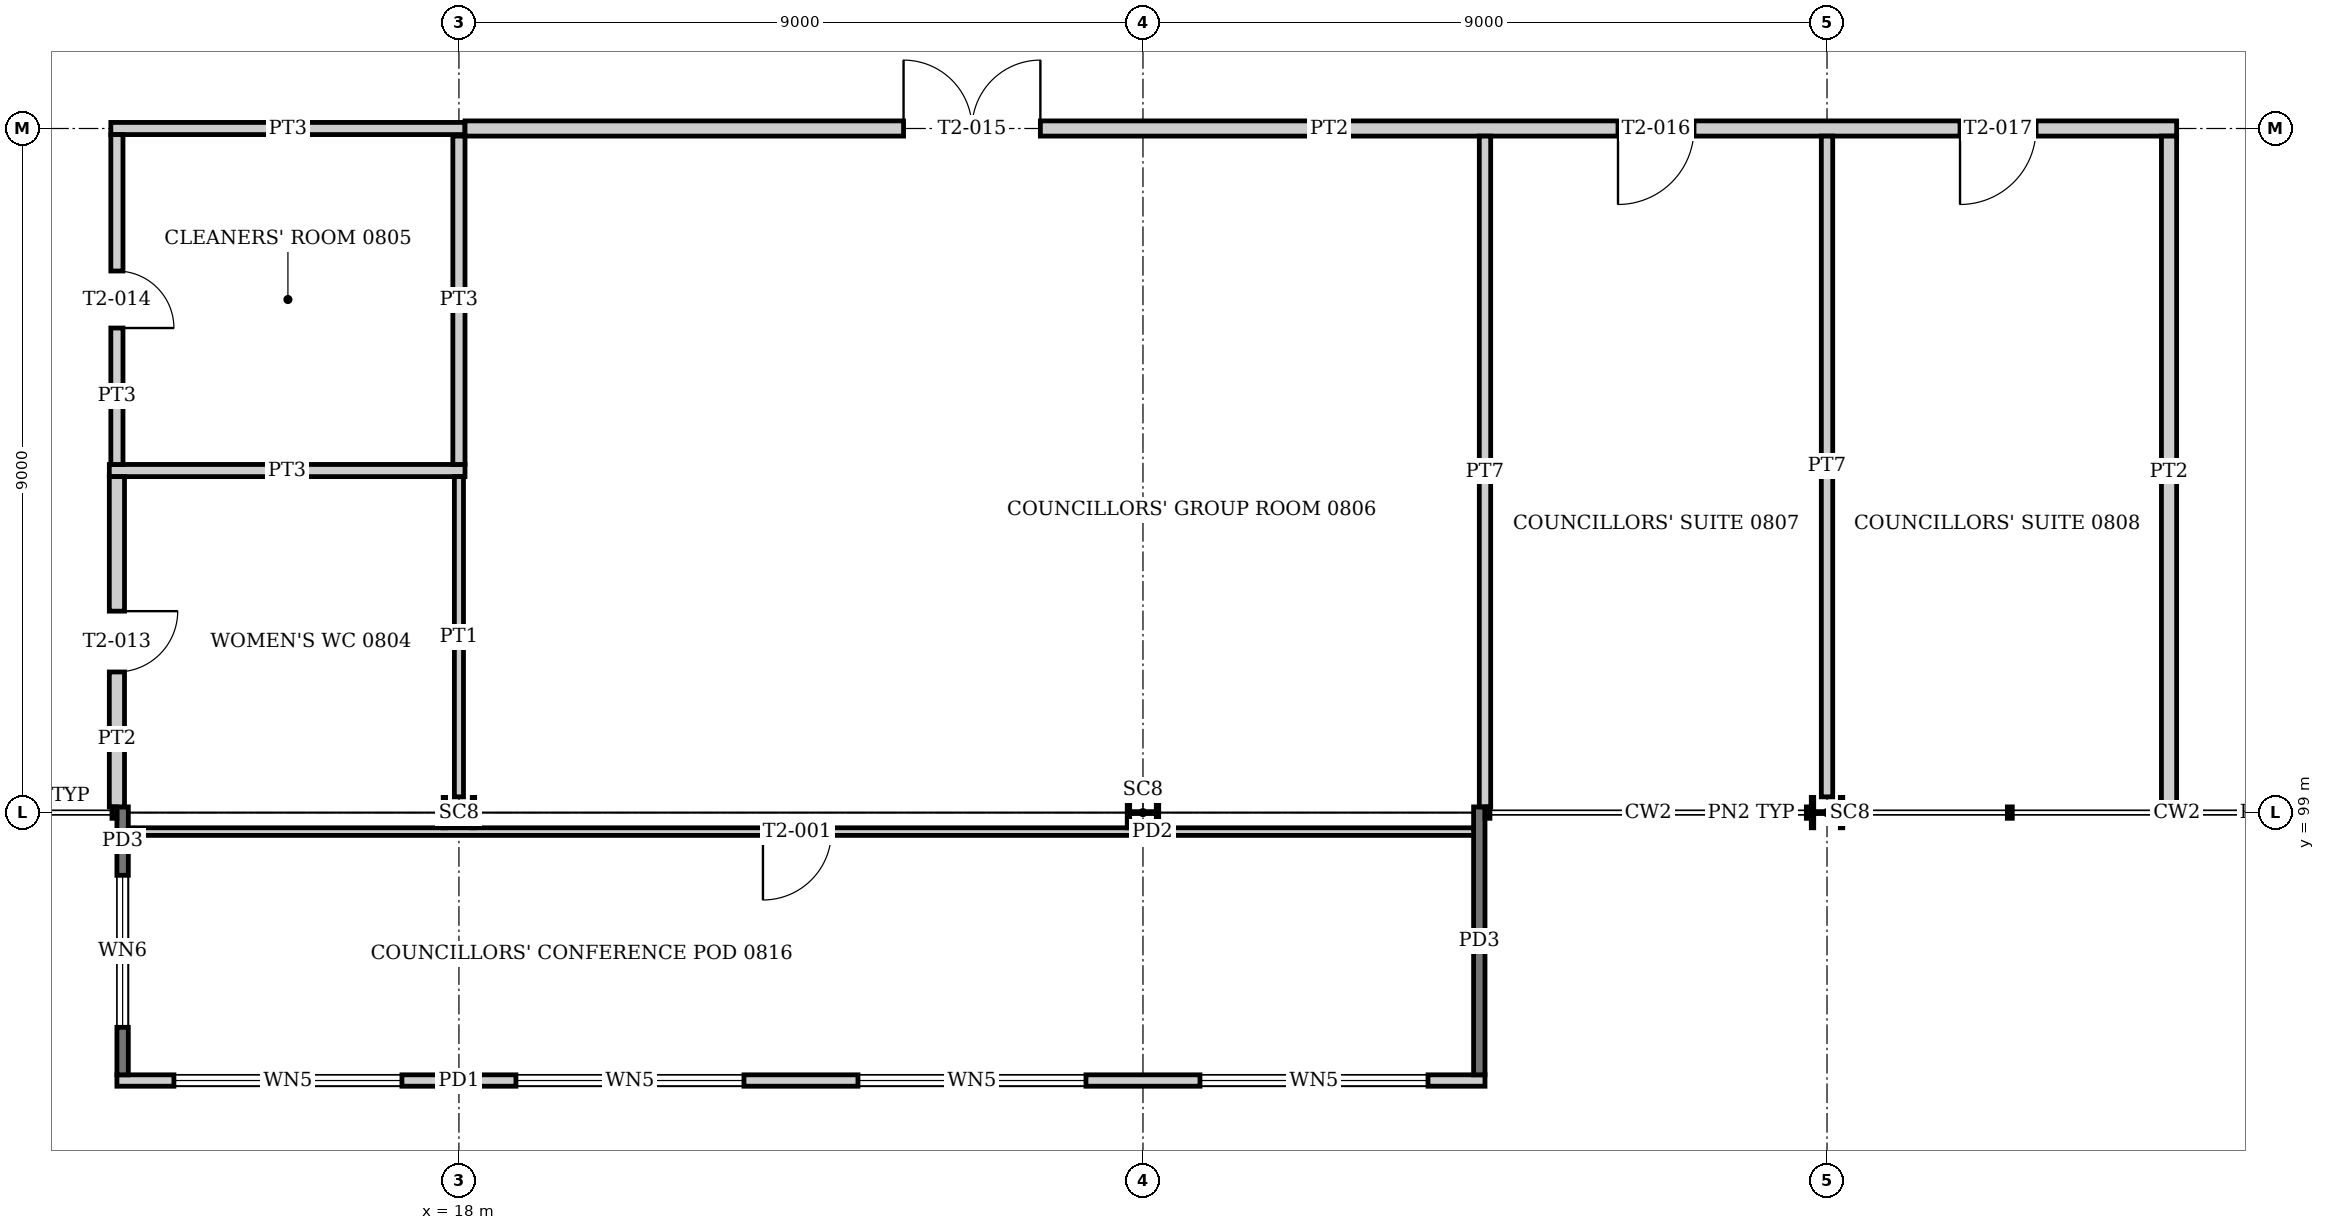
"""IFC4 building model, lengths in metres.
Left out: names, types, materials, properties, quantities, classifications, styles, units other than length and angle.
Written with IfcOpenShell. Run it as: python <this file> out.ifc"""

import sys

from ifc_helpers import new_model, si_unit, direction, frame, frame_2d, origin, origin_2d, place, context, subcontext, project, spatial, rectangle, i_section, extrude, element, fill, save


model = new_model("IFC4")
c1 = context("Model", 3, precision=1e-05, world=origin(), true_north=direction((0.0, 1.0)))
c2 = subcontext(c1, "Body", "Model", "MODEL_VIEW")
j1 = project(units=[si_unit("LENGTHUNIT", "METRE"), si_unit("PLANEANGLEUNIT", "RADIAN")], contexts=[c1])
p1 = place(None, origin())
s1 = spatial("IfcSite", under=j1, at=p1, CompositionType="ELEMENT")
p2 = place(p1, origin())
s2 = spatial("IfcBuilding", under=s1, at=p2, CompositionType="ELEMENT")
p3 = place(p2, frame((0.0, 0.0, 35.2)))
s3 = spatial("IfcBuildingStorey", under=s2, at=p3, CompositionType="ELEMENT", Elevation=35.2)
for number, where, z_axis, x_axis in (
    (1, (18.0, 99.0, 0.0), (0.0, 0.0, 1.0), (0.0, 1.0, 0.0)),
    (2, (27.0, 99.0, 0.0), (0.0, 0.0, 1.0), (0.0, 1.0, 0.0)),
    (3, (36.0, 99.0, 0.0), (0.0, 0.0, 1.0), (0.0, 1.0, 0.0)),
):
    element("IfcColumn", number, at=place(p3, frame(where, z_axis=z_axis, x_axis=x_axis)), inside=s3, PredefinedType="COLUMN", context=c2, shape_type="SweptSolid", body=[
        extrude(i_section(OverallWidth=0.4, OverallDepth=0.414, WebThickness=0.025, FlangeThickness=0.032, at=origin_2d()), origin(), (0.0, 0.0, 1.0), 4.0),
    ])
p4 = place(p3, frame((13.5, 95.475, 0.0), z_axis=(0.0, 0.0, 1.0), x_axis=(1.0, 0.0, 0.0)))
e4 = element("IfcWall", 4, at=p4, inside=s3, PredefinedType="SOLIDWALL", context=c2, shape_type="SweptSolid", body=[
    extrude(rectangle(XDim=18.0, YDim=0.15, at=frame_2d((9.0, 0.0))), origin(), (0.0, 0.0, 1.0), 2.6),
])
p5 = place(p4, frame((0.75, 0.0, 0.9)))
e5 = element("IfcOpeningElement", 5, at=p5, cuts=e4, PredefinedType="OPENING", context=c2, shape_type="SweptSolid", body=[
    extrude(rectangle(XDim=3.0, YDim=1.4, at=frame_2d((1.5, 0.7))), frame((0.0, 0.085, 0.0), z_axis=(0.0, -1.0, 0.0), x_axis=(1.0, 0.0, 0.0)), (0.0, 0.0, 1.0), 0.17),
])
p6 = place(p4, frame((5.25, 0.0, 0.9)))
e6 = element("IfcOpeningElement", 6, at=p6, cuts=e4, PredefinedType="OPENING", context=c2, shape_type="SweptSolid", body=[
    extrude(rectangle(XDim=3.0, YDim=1.4, at=frame_2d((1.5, 0.7))), frame((0.0, 0.085, 0.0), z_axis=(0.0, -1.0, 0.0), x_axis=(1.0, 0.0, 0.0)), (0.0, 0.0, 1.0), 0.17),
])
p7 = place(p4, frame((9.75, 0.0, 0.9)))
e7 = element("IfcOpeningElement", 7, at=p7, cuts=e4, PredefinedType="OPENING", context=c2, shape_type="SweptSolid", body=[
    extrude(rectangle(XDim=3.0, YDim=1.4, at=frame_2d((1.5, 0.7))), frame((0.0, 0.085, 0.0), z_axis=(0.0, -1.0, 0.0), x_axis=(1.0, 0.0, 0.0)), (0.0, 0.0, 1.0), 0.17),
])
p8 = place(p4, frame((14.25, 0.0, 0.9)))
e8 = element("IfcOpeningElement", 8, at=p8, cuts=e4, PredefinedType="OPENING", context=c2, shape_type="SweptSolid", body=[
    extrude(rectangle(XDim=3.0, YDim=1.4, at=frame_2d((1.5, 0.7))), frame((0.0, 0.085, 0.0), z_axis=(0.0, -1.0, 0.0), x_axis=(1.0, 0.0, 0.0)), (0.0, 0.0, 1.0), 0.17),
])
p9 = place(p3, frame((13.575, 95.55, -0.15), z_axis=(0.0, 0.0, 1.0), x_axis=(0.0, 1.0, 0.0)))
e9 = element("IfcWall", 9, at=p9, inside=s3, PredefinedType="SOLIDWALL", context=c2, shape_type="SweptSolid", body=[
    extrude(rectangle(XDim=3.525, YDim=0.15, at=frame_2d((1.762, 0.0))), origin(), (0.0, 0.0, 1.0), 2.75),
])
p10 = place(p9, frame((0.625, 0.0, 1.05)))
e10 = element("IfcOpeningElement", 10, at=p10, cuts=e9, PredefinedType="OPENING", context=c2, shape_type="SweptSolid", body=[
    extrude(rectangle(XDim=2.0, YDim=1.4, at=frame_2d((1.0, 0.7))), frame((0.0, 0.085, 0.0), z_axis=(0.0, -1.0, 0.0), x_axis=(1.0, 0.0, 0.0)), (0.0, 0.0, 1.0), 0.17),
])
p11 = place(p3, frame((31.425, 95.55, -0.15), z_axis=(0.0, 0.0, 1.0), x_axis=(0.0, 1.0, 0.0)))
e11 = element("IfcWall", 11, at=p11, inside=s3, PredefinedType="SOLIDWALL", context=c2, shape_type="SweptSolid", body=[
    extrude(rectangle(XDim=3.525, YDim=0.15, at=frame_2d((1.762, 0.0))), origin(), (0.0, 0.0, 1.0), 2.75),
])
p12 = place(p3, frame((13.65, 98.75, 0.0), z_axis=(0.0, 0.0, 1.0), x_axis=(1.0, 0.0, 0.0)))
e12 = element("IfcWall", 12, at=p12, inside=s3, PredefinedType="PARTITIONING", context=c2, shape_type="SweptSolid", body=[
    extrude(rectangle(XDim=17.7, YDim=0.1, at=frame_2d((8.85, 0.0))), origin(), (0.0, 0.0, 1.0), 2.6),
])
p13 = place(p12, frame((8.35, 0.0, 0.0)))
e13 = element("IfcOpeningElement", 13, at=p13, cuts=e12, PredefinedType="OPENING", context=c2, shape_type="SweptSolid", body=[
    extrude(rectangle(XDim=0.9, YDim=2.1, at=frame_2d((0.45, 1.05))), frame((0.0, 0.06, 0.0), z_axis=(0.0, -1.0, 0.0), x_axis=(1.0, 0.0, 0.0)), (0.0, 0.0, 1.0), 0.12),
])
p14 = place(p3, frame((13.4, 103.5, 0.0), z_axis=(0.0, 0.0, 1.0), x_axis=(1.0, 0.0, 0.0)))
e14 = element("IfcWall", 14, at=p14, inside=s3, PredefinedType="PARTITIONING", context=c2, shape_type="SweptSolid", body=[
    extrude(rectangle(XDim=4.68, YDim=0.16, at=frame_2d((2.34, 0.0))), origin(), (0.0, 0.0, 1.0), 3.05),
])
p15 = place(p3, frame((13.42, 108.0, 0.0), z_axis=(0.0, 0.0, 1.0), x_axis=(1.0, 0.0, 0.0)))
e15 = element("IfcWall", 15, at=p15, inside=s3, PredefinedType="PARTITIONING", context=c2, shape_type="SweptSolid", body=[
    extrude(rectangle(XDim=4.66, YDim=0.16, at=frame_2d((2.33, 0.0))), origin(), (0.0, 0.0, 1.0), 3.05),
])
p16 = place(p3, frame((18.08, 108.0, 0.0), z_axis=(0.0, 0.0, 1.0), x_axis=(1.0, 0.0, 0.0)))
e16 = element("IfcWall", 16, at=p16, inside=s3, PredefinedType="PARTITIONING", context=c2, shape_type="SweptSolid", body=[
    extrude(rectangle(XDim=22.52, YDim=0.2, at=frame_2d((11.26, 0.0))), origin(), (0.0, 0.0, 1.0), 3.05),
])
p17 = place(p16, frame((5.77, 0.0, 0.0)))
e17 = element("IfcOpeningElement", 17, at=p17, cuts=e16, PredefinedType="OPENING", context=c2, shape_type="SweptSolid", body=[
    extrude(rectangle(XDim=1.8, YDim=2.1, at=frame_2d((0.9, 1.05))), frame((0.0, 0.11, 0.0), z_axis=(0.0, -1.0, 0.0), x_axis=(1.0, 0.0, 0.0)), (0.0, 0.0, 1.0), 0.22),
])
p18 = place(p16, frame((15.17, 0.0, 0.0)))
e18 = element("IfcOpeningElement", 18, at=p18, cuts=e16, PredefinedType="OPENING", context=c2, shape_type="SweptSolid", body=[
    extrude(rectangle(XDim=1.0, YDim=2.1, at=frame_2d((0.5, 1.05))), frame((0.0, 0.11, 0.0), z_axis=(0.0, -1.0, 0.0), x_axis=(1.0, 0.0, 0.0)), (0.0, 0.0, 1.0), 0.22),
])
p19 = place(p16, frame((19.67, 0.0, 0.0)))
e19 = element("IfcOpeningElement", 19, at=p19, cuts=e16, PredefinedType="OPENING", context=c2, shape_type="SweptSolid", body=[
    extrude(rectangle(XDim=1.0, YDim=2.1, at=frame_2d((0.5, 1.05))), frame((0.0, 0.11, 0.0), z_axis=(0.0, -1.0, 0.0), x_axis=(1.0, 0.0, 0.0)), (0.0, 0.0, 1.0), 0.22),
])
p20 = place(p3, frame((13.5, 99.075, 0.0), z_axis=(0.0, 0.0, 1.0), x_axis=(0.0, 1.0, 0.0)))
e20 = element("IfcWall", 20, at=p20, inside=s3, PredefinedType="PARTITIONING", context=c2, shape_type="SweptSolid", body=[
    extrude(rectangle(XDim=4.345, YDim=0.2, at=frame_2d((2.172, 0.0))), origin(), (0.0, 0.0, 1.0), 3.05),
])
p21 = place(p20, frame((1.775, 0.0, 0.0)))
e21 = element("IfcOpeningElement", 21, at=p21, cuts=e20, PredefinedType="OPENING", context=c2, shape_type="SweptSolid", body=[
    extrude(rectangle(XDim=0.8, YDim=2.1, at=frame_2d((0.4, 1.05))), frame((0.0, 0.11, 0.0), z_axis=(0.0, -1.0, 0.0), x_axis=(1.0, 0.0, 0.0)), (0.0, 0.0, 1.0), 0.22),
])
p22 = place(p3, frame((13.5, 103.58, 0.0), z_axis=(0.0, 0.0, 1.0), x_axis=(0.0, 1.0, 0.0)))
e22 = element("IfcWall", 22, at=p22, inside=s3, PredefinedType="PARTITIONING", context=c2, shape_type="SweptSolid", body=[
    extrude(rectangle(XDim=4.34, YDim=0.16, at=frame_2d((2.17, 0.0))), origin(), (0.0, 0.0, 1.0), 3.05),
])
p23 = place(p22, frame((1.795, 0.0, 0.0)))
e23 = element("IfcOpeningElement", 23, at=p23, cuts=e22, PredefinedType="OPENING", context=c2, shape_type="SweptSolid", body=[
    extrude(rectangle(XDim=0.75, YDim=2.1, at=frame_2d((0.375, 1.05))), frame((0.0, 0.09, 0.0), z_axis=(0.0, -1.0, 0.0), x_axis=(1.0, 0.0, 0.0)), (0.0, 0.0, 1.0), 0.18),
])
p24 = place(p3, frame((18.0, 99.207, 0.0), z_axis=(0.0, 0.0, 1.0), x_axis=(0.0, 1.0, 0.0)))
e24 = element("IfcWall", 24, at=p24, inside=s3, PredefinedType="PARTITIONING", context=c2, shape_type="SweptSolid", body=[
    extrude(rectangle(XDim=4.213, YDim=0.12, at=frame_2d((2.106, 0.0))), origin(), (0.0, 0.0, 1.0), 3.05),
])
p25 = place(p3, frame((18.0, 103.58, 0.0), z_axis=(0.0, 0.0, 1.0), x_axis=(0.0, 1.0, 0.0)))
e25 = element("IfcWall", 25, at=p25, inside=s3, PredefinedType="PARTITIONING", context=c2, shape_type="SweptSolid", body=[
    extrude(rectangle(XDim=4.32, YDim=0.16, at=frame_2d((2.16, 0.0))), origin(), (0.0, 0.0, 1.0), 3.05),
])
p26 = place(p3, frame((31.5, 99.075, 0.0), z_axis=(0.0, 0.0, 1.0), x_axis=(0.0, 1.0, 0.0)))
e26 = element("IfcWall", 26, at=p26, inside=s3, PredefinedType="PARTITIONING", context=c2, shape_type="SweptSolid", body=[
    extrude(rectangle(XDim=8.825, YDim=0.15, at=frame_2d((4.413, 0.0))), origin(), (0.0, 0.0, 1.0), 3.05),
])
p27 = place(p3, frame((36.0, 99.207, 0.0), z_axis=(0.0, 0.0, 1.0), x_axis=(0.0, 1.0, 0.0)))
e27 = element("IfcWall", 27, at=p27, inside=s3, PredefinedType="PARTITIONING", context=c2, shape_type="SweptSolid", body=[
    extrude(rectangle(XDim=8.693, YDim=0.15, at=frame_2d((4.346, 0.0))), origin(), (0.0, 0.0, 1.0), 3.05),
])
p28 = place(p3, frame((40.5, 99.075, 0.0), z_axis=(0.0, 0.0, 1.0), x_axis=(0.0, 1.0, 0.0)))
e28 = element("IfcWall", 28, at=p28, inside=s3, PredefinedType="PARTITIONING", context=c2, shape_type="SweptSolid", body=[
    extrude(rectangle(XDim=8.825, YDim=0.2, at=frame_2d((4.413, 0.0))), origin(), (0.0, 0.0, 1.0), 3.05),
])
p29 = place(p5, origin())
e29 = element("IfcWindow", 29, at=p29, inside=s3, PartitioningType="SINGLE_PANEL", PredefinedType="WINDOW", context=c2, shape_type="SweptSolid", body=[
    extrude(rectangle(XDim=3.0, YDim=1.4, at=frame_2d((1.5, 0.7))), frame((0.0, 0.03, 0.0), z_axis=(0.0, -1.0, 0.0), x_axis=(1.0, 0.0, 0.0)), (0.0, 0.0, 1.0), 0.06),
])
fill(e5, e29)
p30 = place(p6, origin())
e30 = element("IfcWindow", 30, at=p30, inside=s3, PartitioningType="SINGLE_PANEL", PredefinedType="WINDOW", context=c2, shape_type="SweptSolid", body=[
    extrude(rectangle(XDim=3.0, YDim=1.4, at=frame_2d((1.5, 0.7))), frame((0.0, 0.03, 0.0), z_axis=(0.0, -1.0, 0.0), x_axis=(1.0, 0.0, 0.0)), (0.0, 0.0, 1.0), 0.06),
])
fill(e6, e30)
p31 = place(p7, origin())
e31 = element("IfcWindow", 31, at=p31, inside=s3, PartitioningType="SINGLE_PANEL", PredefinedType="WINDOW", context=c2, shape_type="SweptSolid", body=[
    extrude(rectangle(XDim=3.0, YDim=1.4, at=frame_2d((1.5, 0.7))), frame((0.0, 0.03, 0.0), z_axis=(0.0, -1.0, 0.0), x_axis=(1.0, 0.0, 0.0)), (0.0, 0.0, 1.0), 0.06),
])
fill(e7, e31)
p32 = place(p8, origin())
e32 = element("IfcWindow", 32, at=p32, inside=s3, PartitioningType="SINGLE_PANEL", PredefinedType="WINDOW", context=c2, shape_type="SweptSolid", body=[
    extrude(rectangle(XDim=3.0, YDim=1.4, at=frame_2d((1.5, 0.7))), frame((0.0, 0.03, 0.0), z_axis=(0.0, -1.0, 0.0), x_axis=(1.0, 0.0, 0.0)), (0.0, 0.0, 1.0), 0.06),
])
fill(e8, e32)
p33 = place(p10, origin())
e33 = element("IfcWindow", 33, at=p33, inside=s3, PartitioningType="SINGLE_PANEL", PredefinedType="WINDOW", context=c2, shape_type="SweptSolid", body=[
    extrude(rectangle(XDim=2.0, YDim=1.4, at=frame_2d((1.0, 0.7))), frame((0.0, 0.03, 0.0), z_axis=(0.0, -1.0, 0.0), x_axis=(1.0, 0.0, 0.0)), (0.0, 0.0, 1.0), 0.06),
])
fill(e10, e33)
p34 = place(p13, frame((0.9, 0.0, 0.0), z_axis=(0.0, 0.0, 1.0), x_axis=(-1.0, 0.0, 0.0)))
e34 = element("IfcDoor", 34, at=p34, inside=s3, OperationType="SINGLE_SWING_RIGHT", PredefinedType="DOOR", context=c2, shape_type="SweptSolid", body=[
    extrude(rectangle(XDim=0.9, YDim=2.1, at=frame_2d((0.45, 1.05))), frame((0.0, 0.025, 0.0), z_axis=(0.0, -1.0, 0.0), x_axis=(1.0, 0.0, 0.0)), (0.0, 0.0, 1.0), 0.05),
])
fill(e13, e34)
p35 = place(p21, frame((0.8, 0.0, 0.0), z_axis=(0.0, 0.0, 1.0), x_axis=(-1.0, 0.0, 0.0)))
e35 = element("IfcDoor", 35, at=p35, inside=s3, OperationType="SINGLE_SWING_LEFT", PredefinedType="DOOR", context=c2, shape_type="SweptSolid", body=[
    extrude(rectangle(XDim=0.8, YDim=2.1, at=frame_2d((0.4, 1.05))), frame((0.0, 0.025, 0.0), z_axis=(0.0, -1.0, 0.0), x_axis=(1.0, 0.0, 0.0)), (0.0, 0.0, 1.0), 0.05),
])
fill(e21, e35)
p36 = place(p23, frame((0.75, 0.0, 0.0), z_axis=(0.0, 0.0, 1.0), x_axis=(-1.0, 0.0, 0.0)))
e36 = element("IfcDoor", 36, at=p36, inside=s3, OperationType="SINGLE_SWING_RIGHT", PredefinedType="DOOR", context=c2, shape_type="SweptSolid", body=[
    extrude(rectangle(XDim=0.75, YDim=2.1, at=frame_2d((0.375, 1.05))), frame((0.0, 0.025, 0.0), z_axis=(0.0, -1.0, 0.0), x_axis=(1.0, 0.0, 0.0)), (0.0, 0.0, 1.0), 0.05),
])
fill(e23, e36)
p37 = place(p17, origin())
e37 = element("IfcDoor", 37, at=p37, inside=s3, OperationType="DOUBLE_DOOR_SINGLE_SWING", PredefinedType="DOOR", context=c2, shape_type="SweptSolid", body=[
    extrude(rectangle(XDim=1.8, YDim=2.1, at=frame_2d((0.9, 1.05))), frame((0.0, 0.025, 0.0), z_axis=(0.0, -1.0, 0.0), x_axis=(1.0, 0.0, 0.0)), (0.0, 0.0, 1.0), 0.05),
])
fill(e17, e37)
p38 = place(p18, frame((1.0, 0.0, 0.0), z_axis=(0.0, 0.0, 1.0), x_axis=(-1.0, 0.0, 0.0)))
e38 = element("IfcDoor", 38, at=p38, inside=s3, OperationType="SINGLE_SWING_RIGHT", PredefinedType="DOOR", context=c2, shape_type="SweptSolid", body=[
    extrude(rectangle(XDim=1.0, YDim=2.1, at=frame_2d((0.5, 1.05))), frame((0.0, 0.025, 0.0), z_axis=(0.0, -1.0, 0.0), x_axis=(1.0, 0.0, 0.0)), (0.0, 0.0, 1.0), 0.05),
])
fill(e18, e38)
p39 = place(p19, frame((1.0, 0.0, 0.0), z_axis=(0.0, 0.0, 1.0), x_axis=(-1.0, 0.0, 0.0)))
e39 = element("IfcDoor", 39, at=p39, inside=s3, OperationType="SINGLE_SWING_RIGHT", PredefinedType="DOOR", context=c2, shape_type="SweptSolid", body=[
    extrude(rectangle(XDim=1.0, YDim=2.1, at=frame_2d((0.5, 1.05))), frame((0.0, 0.025, 0.0), z_axis=(0.0, -1.0, 0.0), x_axis=(1.0, 0.0, 0.0)), (0.0, 0.0, 1.0), 0.05),
])
fill(e19, e39)
save(model, sys.argv[1])
